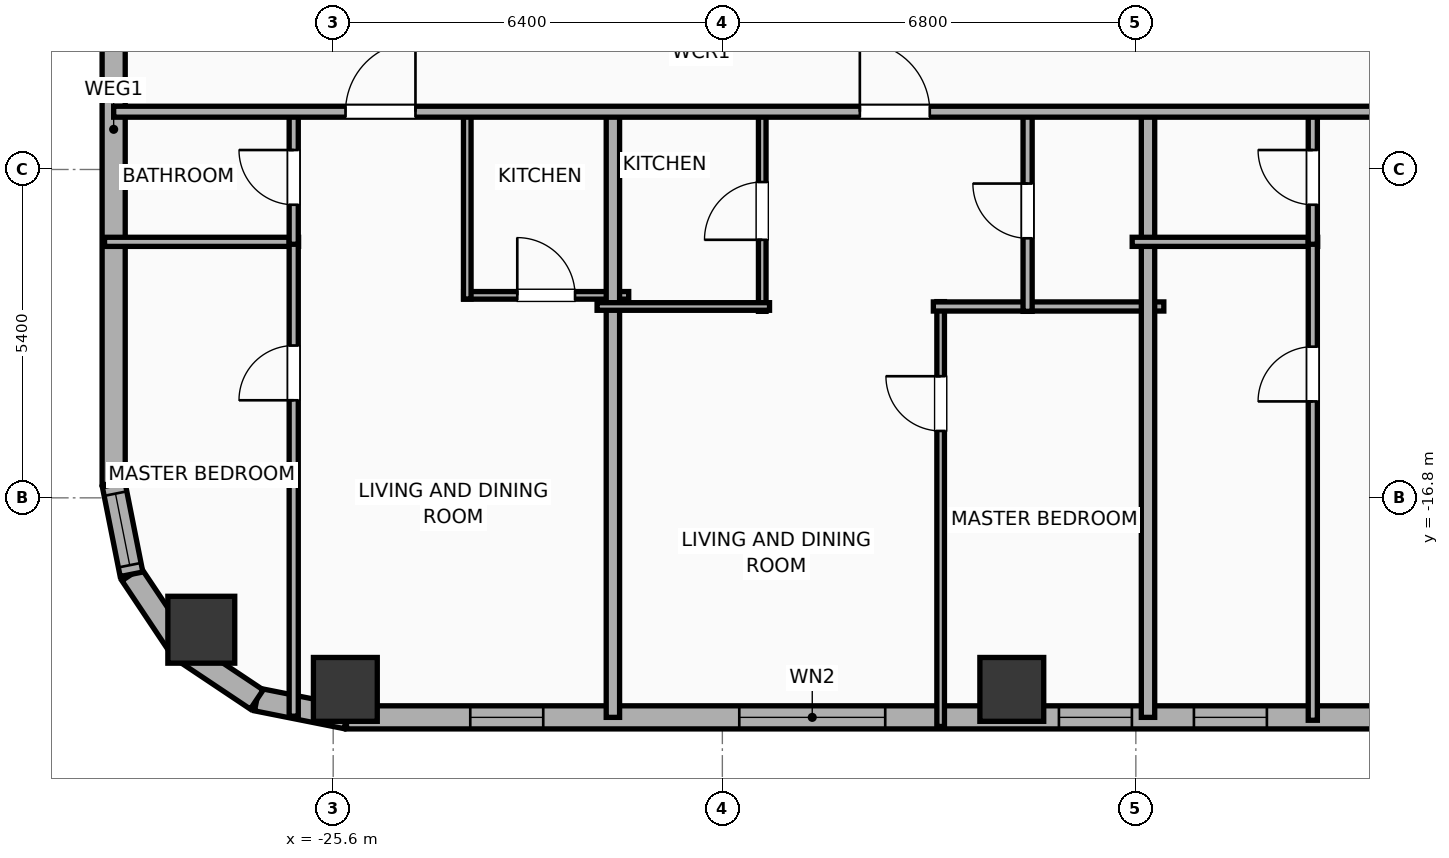
"""IFC4 building model, lengths in metres.
Left out: names, types, materials, properties, quantities, classifications, styles, units other than length and angle.
Written with IfcOpenShell. Run it as: python <this file> out.ifc"""

import sys

from ifc_helpers import new_model, si_unit, direction, frame, frame_2d, origin, origin_2d, place, context, subcontext, project, spatial, rectangle, hollow_rectangle, hollow_circle, extrude, element, fill, save


model = new_model("IFC4")
c1 = context("Model", 3, precision=1e-05, world=origin(), true_north=direction((0.0, 1.0)))
c2 = subcontext(c1, "Body", "Model", "MODEL_VIEW")
j1 = project(units=[si_unit("LENGTHUNIT", "METRE"), si_unit("PLANEANGLEUNIT", "RADIAN")], contexts=[c1])
p1 = place(None, origin())
s1 = spatial("IfcSite", under=j1, at=p1, CompositionType="ELEMENT")
p2 = place(p1, origin())
s2 = spatial("IfcBuilding", under=s1, at=p2, CompositionType="ELEMENT")
p3 = place(p2, frame((0.0, 0.0, 117.0)))
s3 = spatial("IfcBuildingStorey", under=s2, at=p3, CompositionType="ELEMENT", Elevation=117.0)
for number, where, z_axis, x_axis in (
    (1, (-25.4, -19.95, 0.0), (0.0, 0.0, 1.0), (1.0, 0.0, 0.0)),
    (2, (-14.44, -19.95, 0.0), (0.0, 0.0, 1.0), (1.0, 0.0, 0.0)),
):
    element("IfcColumn", number, at=place(p3, frame(where, z_axis=z_axis, x_axis=x_axis)), inside=s3, PredefinedType="COLUMN", context=c2, shape_type="SweptSolid", body=[
        extrude(hollow_rectangle(XDim=1.05, YDim=1.05, WallThickness=0.036, at=origin_2d()), origin(), (0.0, 0.0, 1.0), 3.9),
    ])
p4 = place(p3, frame((-27.769, -18.969, 0.0), z_axis=(0.0, 0.0, 1.0), x_axis=(1.0, 0.0, 0.0)))
e3 = element("IfcColumn", 3, at=p4, inside=s3, PredefinedType="COLUMN", context=c2, shape_type="SweptSolid", body=[
    extrude(hollow_circle(Radius=0.55, WallThickness=0.036, at=origin_2d()), origin(), (0.0, 0.0, 1.0), 3.9),
])
p5 = place(p3, frame((-6.762, -20.41, 0.0), z_axis=(0.0, 0.0, 1.0), x_axis=(-1.0, 0.0, 0.0)))
e4 = element("IfcWall", 4, at=p5, inside=s3, PredefinedType="ELEMENTEDWALL", context=c2, shape_type="SweptSolid", body=[
    extrude(rectangle(XDim=18.619, YDim=0.38, at=frame_2d((9.31, 0.0))), origin(), (0.0, 0.0, 1.0), 3.65),
])
p6 = place(p5, frame((9.76, 0.0, 0.75)))
e5 = element("IfcOpeningElement", 5, at=p6, cuts=e4, PredefinedType="OPENING", context=c2, shape_type="SweptSolid", body=[
    extrude(rectangle(XDim=2.4, YDim=2.1, at=frame_2d((1.2, 1.05))), frame((0.0, 0.2, 0.0), z_axis=(0.0, -1.0, 0.0), x_axis=(1.0, 0.0, 0.0)), (0.0, 0.0, 1.0), 0.4),
])
p7 = place(p5, frame((15.384, 0.0, 0.75)))
e6 = element("IfcOpeningElement", 6, at=p7, cuts=e4, PredefinedType="OPENING", context=c2, shape_type="SweptSolid", body=[
    extrude(rectangle(XDim=1.2, YDim=2.05, at=frame_2d((0.6, 1.025))), frame((0.0, 0.2, 0.0), z_axis=(0.0, -1.0, 0.0), x_axis=(1.0, 0.0, 0.0)), (0.0, 0.0, 1.0), 0.4),
])
p8 = place(p5, frame((5.703, 0.0, 0.75)))
e7 = element("IfcOpeningElement", 7, at=p8, cuts=e4, PredefinedType="OPENING", context=c2, shape_type="SweptSolid", body=[
    extrude(rectangle(XDim=1.2, YDim=2.05, at=frame_2d((0.6, 1.025))), frame((0.0, 0.2, 0.0), z_axis=(0.0, -1.0, 0.0), x_axis=(1.0, 0.0, 0.0)), (0.0, 0.0, 1.0), 0.4),
])
p9 = place(p5, frame((3.483, 0.0, 0.75)))
e8 = element("IfcOpeningElement", 8, at=p9, cuts=e4, PredefinedType="OPENING", context=c2, shape_type="SweptSolid", body=[
    extrude(rectangle(XDim=1.2, YDim=2.05, at=frame_2d((0.6, 1.025))), frame((0.0, 0.2, 0.0), z_axis=(0.0, -1.0, 0.0), x_axis=(1.0, 0.0, 0.0)), (0.0, 0.0, 1.0), 0.4),
])
p10 = place(p3, frame((-25.381, -20.41, 0.0), z_axis=(0.0, 0.0, 1.0), x_axis=(-0.980786132421, 0.195086038585, 0.0)))
e9 = element("IfcWall", 9, at=p10, inside=s3, PredefinedType="ELEMENTEDWALL", context=c2, shape_type="SweptSolid", body=[
    extrude(rectangle(XDim=1.504, YDim=0.38, at=frame_2d((0.752, 0.0))), origin(), (0.0, 0.0, 1.0), 3.65),
])
p11 = place(p3, frame((-26.857, -20.116, 0.0), z_axis=(0.0, 0.0, 1.0), x_axis=(-0.831468045563, 0.555572577804, 0.0)))
e10 = element("IfcWall", 10, at=p11, inside=s3, PredefinedType="ELEMENTEDWALL", context=c2, shape_type="SweptSolid", body=[
    extrude(rectangle(XDim=1.485, YDim=0.38, at=frame_2d((0.742, 0.0))), origin(), (0.0, 0.0, 1.0), 3.65),
])
p12 = place(p3, frame((-28.091, -19.292, 0.0), z_axis=(0.0, 0.0, 1.0), x_axis=(-0.555610286119, 0.831442848281, 0.0)))
e11 = element("IfcWall", 11, at=p12, inside=s3, PredefinedType="ELEMENTEDWALL", context=c2, shape_type="SweptSolid", body=[
    extrude(rectangle(XDim=1.485, YDim=0.38, at=frame_2d((0.743, 0.0))), origin(), (0.0, 0.0, 1.0), 3.65),
])
p13 = place(p3, frame((-28.917, -18.057, 0.0), z_axis=(0.0, 0.0, 1.0), x_axis=(-0.195086038585, 0.980786132421, 0.0)))
e12 = element("IfcWall", 12, at=p13, inside=s3, PredefinedType="ELEMENTEDWALL", context=c2, shape_type="SweptSolid", body=[
    extrude(rectangle(XDim=1.504, YDim=0.38, at=frame_2d((0.752, 0.0))), origin(), (0.0, 0.0, 1.0), 3.65),
])
p14 = place(p13, frame((0.152, 0.0, 0.75)))
e13 = element("IfcOpeningElement", 13, at=p14, cuts=e12, PredefinedType="OPENING", context=c2, shape_type="SweptSolid", body=[
    extrude(rectangle(XDim=1.2, YDim=2.05, at=frame_2d((0.6, 1.025))), frame((0.0, 0.2, 0.0), z_axis=(0.0, -1.0, 0.0), x_axis=(1.0, 0.0, 0.0)), (0.0, 0.0, 1.0), 0.4),
])
p15 = place(p3, frame((-29.21, -16.581, 0.0), z_axis=(0.0, 0.0, 1.0), x_axis=(0.0, 1.0, 0.0)))
e14 = element("IfcWall", 14, at=p15, inside=s3, PredefinedType="ELEMENTEDWALL", context=c2, shape_type="SweptSolid", body=[
    extrude(rectangle(XDim=11.683, YDim=0.38, at=frame_2d((5.842, 0.0))), origin(), (0.0, 0.0, 1.0), 3.65),
])
p16 = place(p3, frame((-29.36, -12.59, 0.0), z_axis=(0.0, 0.0, 1.0), x_axis=(1.0, 0.0, 0.0)))
e15 = element("IfcWall", 15, at=p16, inside=s3, PredefinedType="PLUMBINGWALL", context=c2, shape_type="SweptSolid", body=[
    extrude(rectangle(XDim=3.191, YDim=0.15, at=frame_2d((1.596, 0.0))), origin(), (0.0, 0.0, 1.0), 3.65),
])
p17 = place(p3, frame((-26.249, -20.39, 0.0), z_axis=(0.0, 0.0, 1.0), x_axis=(0.0, 1.0, 0.0)))
e16 = element("IfcWall", 16, at=p17, inside=s3, PredefinedType="PLUMBINGWALL", context=c2, shape_type="SweptSolid", body=[
    extrude(rectangle(XDim=7.84, YDim=0.15, at=frame_2d((3.92, 0.0))), origin(), (0.0, 0.0, 1.0), 3.65),
])
p18 = place(p17, frame((5.195, 0.0, 0.0)))
e17 = element("IfcOpeningElement", 17, at=p18, cuts=e16, PredefinedType="OPENING", context=c2, shape_type="SweptSolid", body=[
    extrude(rectangle(XDim=0.9, YDim=2.05, at=frame_2d((0.45, 1.025))), frame((0.0, 0.085, 0.0), z_axis=(0.0, -1.0, 0.0), x_axis=(1.0, 0.0, 0.0)), (0.0, 0.0, 1.0), 0.17),
])
p19 = place(p3, frame((-26.249, -12.63, 0.0), z_axis=(0.0, 0.0, 1.0), x_axis=(0.0, 1.0, 0.0)))
e18 = element("IfcWall", 18, at=p19, inside=s3, PredefinedType="PLUMBINGWALL", context=c2, shape_type="SweptSolid", body=[
    extrude(rectangle(XDim=2.2, YDim=0.15, at=frame_2d((1.1, 0.0))), origin(), (0.0, 0.0, 1.0), 3.65),
])
p20 = place(p19, frame((0.65, 0.0, 0.0)))
e19 = element("IfcOpeningElement", 19, at=p20, cuts=e18, PredefinedType="OPENING", context=c2, shape_type="SweptSolid", body=[
    extrude(rectangle(XDim=0.9, YDim=2.05, at=frame_2d((0.45, 1.025))), frame((0.0, 0.085, 0.0), z_axis=(0.0, -1.0, 0.0), x_axis=(1.0, 0.0, 0.0)), (0.0, 0.0, 1.0), 0.17),
])
p21 = place(p3, frame((-23.455, -13.47, 0.0), z_axis=(0.0, 0.0, 1.0), x_axis=(1.0, 0.0, 0.0)))
e20 = element("IfcWall", 20, at=p21, inside=s3, PredefinedType="PARTITIONING", context=c2, shape_type="SweptSolid", body=[
    extrude(rectangle(XDim=2.715, YDim=0.125, at=frame_2d((1.357, 0.0))), origin(), (0.0, 0.0, 1.0), 3.65),
])
p22 = place(p21, frame((0.883, 0.0, 0.0)))
e21 = element("IfcOpeningElement", 21, at=p22, cuts=e20, PredefinedType="OPENING", context=c2, shape_type="SweptSolid", body=[
    extrude(rectangle(XDim=0.95, YDim=2.05, at=frame_2d((0.475, 1.025))), frame((0.0, 0.073, 0.0), z_axis=(0.0, -1.0, 0.0), x_axis=(1.0, 0.0, 0.0)), (0.0, 0.0, 1.0), 0.145),
])
p23 = place(p3, frame((-23.395, -13.53, 0.0), z_axis=(0.0, 0.0, 1.0), x_axis=(0.0, 1.0, 0.0)))
e22 = element("IfcWall", 22, at=p23, inside=s3, PredefinedType="PARTITIONING", context=c2, shape_type="SweptSolid", body=[
    extrude(rectangle(XDim=3.1, YDim=0.125, at=frame_2d((1.55, 0.0))), origin(), (0.0, 0.0, 1.0), 3.65),
])
p24 = place(p3, frame((-21.0, -20.41, 0.0), z_axis=(0.0, 0.0, 1.0), x_axis=(0.0, 1.0, 0.0)))
e23 = element("IfcWall", 23, at=p24, inside=s3, PredefinedType="PARTITIONING", context=c2, shape_type="SweptSolid", body=[
    extrude(rectangle(XDim=10.04, YDim=0.22, at=frame_2d((5.02, 0.0))), origin(), (0.0, 0.0, 1.0), 3.65),
])
p25 = place(p3, frame((-15.61, -20.56, 0.0), z_axis=(0.0, 0.0, 1.0), x_axis=(0.0, 1.0, 0.0)))
e24 = element("IfcWall", 24, at=p25, inside=s3, PredefinedType="PARTITIONING", context=c2, shape_type="SweptSolid", body=[
    extrude(rectangle(XDim=6.987, YDim=0.125, at=frame_2d((3.494, 0.0))), origin(), (0.0, 0.0, 1.0), 3.65),
])
p26 = place(p25, frame((4.86, 0.0, 0.0)))
e25 = element("IfcOpeningElement", 25, at=p26, cuts=e24, PredefinedType="OPENING", context=c2, shape_type="SweptSolid", body=[
    extrude(rectangle(XDim=0.9, YDim=2.05, at=frame_2d((0.45, 1.025))), frame((0.0, 0.073, 0.0), z_axis=(0.0, -1.0, 0.0), x_axis=(1.0, 0.0, 0.0)), (0.0, 0.0, 1.0), 0.145),
])
p27 = place(p3, frame((-15.73, -13.653, 0.0), z_axis=(0.0, 0.0, 1.0), x_axis=(1.0, 0.0, 0.0)))
e26 = element("IfcWall", 26, at=p27, inside=s3, PredefinedType="PLUMBINGWALL", context=c2, shape_type="SweptSolid", body=[
    extrude(rectangle(XDim=3.79, YDim=0.15, at=frame_2d((1.895, 0.0))), origin(), (0.0, 0.0, 1.0), 3.65),
])
p28 = place(p3, frame((-18.544, -13.733, 0.0), z_axis=(0.0, 0.0, 1.0), x_axis=(0.0, 1.0, 0.0)))
e27 = element("IfcWall", 27, at=p28, inside=s3, PredefinedType="PARTITIONING", context=c2, shape_type="SweptSolid", body=[
    extrude(rectangle(XDim=3.303, YDim=0.125, at=frame_2d((1.651, 0.0))), origin(), (0.0, 0.0, 1.0), 3.65),
])
p29 = place(p28, frame((1.177, 0.0, 0.0)))
e28 = element("IfcOpeningElement", 28, at=p29, cuts=e27, PredefinedType="OPENING", context=c2, shape_type="SweptSolid", body=[
    extrude(rectangle(XDim=0.95, YDim=2.05, at=frame_2d((0.475, 1.025))), frame((0.0, 0.073, 0.0), z_axis=(0.0, -1.0, 0.0), x_axis=(1.0, 0.0, 0.0)), (0.0, 0.0, 1.0), 0.145),
])
p30 = place(p3, frame((-21.26, -13.653, 0.0), z_axis=(0.0, 0.0, 1.0), x_axis=(1.0, 0.0, 0.0)))
e29 = element("IfcWall", 29, at=p30, inside=s3, PredefinedType="PARTITIONING", context=c2, shape_type="SweptSolid", body=[
    extrude(rectangle(XDim=2.836, YDim=0.125, at=frame_2d((1.418, 0.0))), origin(), (0.0, 0.0, 1.0), 3.65),
])
p31 = place(p3, frame((-14.18, -13.733, 0.0), z_axis=(0.0, 0.0, 1.0), x_axis=(0.0, 1.0, 0.0)))
e30 = element("IfcWall", 30, at=p31, inside=s3, PredefinedType="PLUMBINGWALL", context=c2, shape_type="SweptSolid", body=[
    extrude(rectangle(XDim=3.303, YDim=0.15, at=frame_2d((1.651, 0.0))), origin(), (0.0, 0.0, 1.0), 3.65),
])
p32 = place(p31, frame((1.201, 0.0, 0.0)))
e31 = element("IfcOpeningElement", 31, at=p32, cuts=e30, PredefinedType="OPENING", context=c2, shape_type="SweptSolid", body=[
    extrude(rectangle(XDim=0.9, YDim=2.05, at=frame_2d((0.45, 1.025))), frame((0.0, 0.085, 0.0), z_axis=(0.0, -1.0, 0.0), x_axis=(1.0, 0.0, 0.0)), (0.0, 0.0, 1.0), 0.17),
])
p33 = place(p3, frame((-12.2, -20.41, 0.0), z_axis=(0.0, 0.0, 1.0), x_axis=(0.0, 1.0, 0.0)))
e32 = element("IfcWall", 32, at=p33, inside=s3, PredefinedType="PARTITIONING", context=c2, shape_type="SweptSolid", body=[
    extrude(rectangle(XDim=10.04, YDim=0.22, at=frame_2d((5.02, 0.0))), origin(), (0.0, 0.0, 1.0), 3.65),
])
p34 = place(p3, frame((-12.46, -12.59, 0.0), z_axis=(0.0, 0.0, 1.0), x_axis=(1.0, 0.0, 0.0)))
e33 = element("IfcWall", 33, at=p34, inside=s3, PredefinedType="PLUMBINGWALL", context=c2, shape_type="SweptSolid", body=[
    extrude(rectangle(XDim=3.05, YDim=0.15, at=frame_2d((1.525, 0.0))), origin(), (0.0, 0.0, 1.0), 3.65),
])
p35 = place(p3, frame((-9.49, -20.458, 0.0), z_axis=(0.0, 0.0, 1.0), x_axis=(0.0, 1.0, 0.0)))
e34 = element("IfcWall", 34, at=p35, inside=s3, PredefinedType="PLUMBINGWALL", context=c2, shape_type="SweptSolid", body=[
    extrude(rectangle(XDim=7.907, YDim=0.15, at=frame_2d((3.954, 0.0))), origin(), (0.0, 0.0, 1.0), 3.65),
])
p36 = place(p35, frame((5.243, 0.0, 0.0)))
e35 = element("IfcOpeningElement", 35, at=p36, cuts=e34, PredefinedType="OPENING", context=c2, shape_type="SweptSolid", body=[
    extrude(rectangle(XDim=0.9, YDim=2.05, at=frame_2d((0.45, 1.025))), frame((0.0, 0.085, 0.0), z_axis=(0.0, -1.0, 0.0), x_axis=(1.0, 0.0, 0.0)), (0.0, 0.0, 1.0), 0.17),
])
p37 = place(p3, frame((-9.49, -12.63, 0.0), z_axis=(0.0, 0.0, 1.0), x_axis=(0.0, 1.0, 0.0)))
e36 = element("IfcWall", 36, at=p37, inside=s3, PredefinedType="PLUMBINGWALL", context=c2, shape_type="SweptSolid", body=[
    extrude(rectangle(XDim=2.2, YDim=0.15, at=frame_2d((1.1, 0.0))), origin(), (0.0, 0.0, 1.0), 3.65),
])
p38 = place(p37, frame((0.65, 0.0, 0.0)))
e37 = element("IfcOpeningElement", 37, at=p38, cuts=e36, PredefinedType="OPENING", context=c2, shape_type="SweptSolid", body=[
    extrude(rectangle(XDim=0.9, YDim=2.05, at=frame_2d((0.45, 1.025))), frame((0.0, 0.085, 0.0), z_axis=(0.0, -1.0, 0.0), x_axis=(1.0, 0.0, 0.0)), (0.0, 0.0, 1.0), 0.17),
])
p39 = place(p3, frame((-29.21, -10.45, 0.0), z_axis=(0.0, 0.0, 1.0), x_axis=(1.0, 0.0, 0.0)))
e38 = element("IfcWall", 38, at=p39, inside=s3, PredefinedType="PARTITIONING", context=c2, shape_type="SweptSolid", body=[
    extrude(rectangle(XDim=62.42, YDim=0.18, at=frame_2d((31.21, 0.0))), origin(), (0.0, 0.0, 1.0), 3.65),
])
p40 = place(p39, frame((3.813, 0.0, 0.0)))
e39 = element("IfcOpeningElement", 39, at=p40, cuts=e38, PredefinedType="OPENING", context=c2, shape_type="SweptSolid", body=[
    extrude(rectangle(XDim=1.15, YDim=2.05, at=frame_2d((0.575, 1.025))), frame((0.0, 0.1, 0.0), z_axis=(0.0, -1.0, 0.0), x_axis=(1.0, 0.0, 0.0)), (0.0, 0.0, 1.0), 0.2),
])
p41 = place(p39, frame((12.271, 0.0, 0.0)))
e40 = element("IfcOpeningElement", 40, at=p41, cuts=e38, PredefinedType="OPENING", context=c2, shape_type="SweptSolid", body=[
    extrude(rectangle(XDim=1.15, YDim=2.05, at=frame_2d((0.575, 1.025))), frame((0.0, 0.1, 0.0), z_axis=(0.0, -1.0, 0.0), x_axis=(1.0, 0.0, 0.0)), (0.0, 0.0, 1.0), 0.2),
])
p42 = place(p39, frame((20.804, 0.0, 0.0)))
e41 = element("IfcOpeningElement", 41, at=p42, cuts=e38, PredefinedType="OPENING", context=c2, shape_type="SweptSolid", body=[
    extrude(rectangle(XDim=1.15, YDim=2.05, at=frame_2d((0.575, 1.025))), frame((0.0, 0.1, 0.0), z_axis=(0.0, -1.0, 0.0), x_axis=(1.0, 0.0, 0.0)), (0.0, 0.0, 1.0), 0.2),
])
p43 = place(p39, frame((29.848, 0.0, 0.0)))
e42 = element("IfcOpeningElement", 42, at=p43, cuts=e38, PredefinedType="OPENING", context=c2, shape_type="SweptSolid", body=[
    extrude(rectangle(XDim=1.15, YDim=2.05, at=frame_2d((0.575, 1.025))), frame((0.0, 0.1, 0.0), z_axis=(0.0, -1.0, 0.0), x_axis=(1.0, 0.0, 0.0)), (0.0, 0.0, 1.0), 0.2),
])
p44 = place(p39, frame((38.45, 0.0, 0.0)))
e43 = element("IfcOpeningElement", 43, at=p44, cuts=e38, PredefinedType="OPENING", context=c2, shape_type="SweptSolid", body=[
    extrude(rectangle(XDim=1.15, YDim=2.05, at=frame_2d((0.575, 1.025))), frame((0.0, 0.1, 0.0), z_axis=(0.0, -1.0, 0.0), x_axis=(1.0, 0.0, 0.0)), (0.0, 0.0, 1.0), 0.2),
])
p45 = place(p39, frame((47.42, 0.0, 0.0)))
e44 = element("IfcOpeningElement", 44, at=p45, cuts=e38, PredefinedType="OPENING", context=c2, shape_type="SweptSolid", body=[
    extrude(rectangle(XDim=1.15, YDim=2.05, at=frame_2d((0.575, 1.025))), frame((0.0, 0.1, 0.0), z_axis=(0.0, -1.0, 0.0), x_axis=(1.0, 0.0, 0.0)), (0.0, 0.0, 1.0), 0.2),
])
p46 = place(p39, frame((56.92, 0.0, 0.0)))
e45 = element("IfcOpeningElement", 45, at=p46, cuts=e38, PredefinedType="OPENING", context=c2, shape_type="SweptSolid", body=[
    extrude(rectangle(XDim=1.15, YDim=2.05, at=frame_2d((0.575, 1.025))), frame((0.0, 0.1, 0.0), z_axis=(0.0, -1.0, 0.0), x_axis=(1.0, 0.0, 0.0)), (0.0, 0.0, 1.0), 0.2),
])
p47 = place(p6, origin())
e46 = element("IfcWindow", 46, at=p47, inside=s3, PartitioningType="SINGLE_PANEL", PredefinedType="WINDOW", context=c2, shape_type="SweptSolid", body=[
    extrude(rectangle(XDim=2.4, YDim=2.1, at=frame_2d((1.2, 1.05))), frame((0.0, 0.03, 0.0), z_axis=(0.0, -1.0, 0.0), x_axis=(1.0, 0.0, 0.0)), (0.0, 0.0, 1.0), 0.06),
])
fill(e5, e46)
p48 = place(p14, origin())
e47 = element("IfcWindow", 47, at=p48, inside=s3, PartitioningType="SINGLE_PANEL", PredefinedType="WINDOW", context=c2, shape_type="SweptSolid", body=[
    extrude(rectangle(XDim=1.2, YDim=2.05, at=frame_2d((0.6, 1.025))), frame((0.0, 0.03, 0.0), z_axis=(0.0, -1.0, 0.0), x_axis=(1.0, 0.0, 0.0)), (0.0, 0.0, 1.0), 0.06),
])
fill(e13, e47)
p49 = place(p7, origin())
e48 = element("IfcWindow", 48, at=p49, inside=s3, PartitioningType="SINGLE_PANEL", PredefinedType="WINDOW", context=c2, shape_type="SweptSolid", body=[
    extrude(rectangle(XDim=1.2, YDim=2.05, at=frame_2d((0.6, 1.025))), frame((0.0, 0.03, 0.0), z_axis=(0.0, -1.0, 0.0), x_axis=(1.0, 0.0, 0.0)), (0.0, 0.0, 1.0), 0.06),
])
fill(e6, e48)
p50 = place(p8, origin())
e49 = element("IfcWindow", 49, at=p50, inside=s3, PartitioningType="SINGLE_PANEL", PredefinedType="WINDOW", context=c2, shape_type="SweptSolid", body=[
    extrude(rectangle(XDim=1.2, YDim=2.05, at=frame_2d((0.6, 1.025))), frame((0.0, 0.03, 0.0), z_axis=(0.0, -1.0, 0.0), x_axis=(1.0, 0.0, 0.0)), (0.0, 0.0, 1.0), 0.06),
])
fill(e7, e49)
p51 = place(p9, origin())
e50 = element("IfcWindow", 50, at=p51, inside=s3, PartitioningType="SINGLE_PANEL", PredefinedType="WINDOW", context=c2, shape_type="SweptSolid", body=[
    extrude(rectangle(XDim=1.2, YDim=2.05, at=frame_2d((0.6, 1.025))), frame((0.0, 0.03, 0.0), z_axis=(0.0, -1.0, 0.0), x_axis=(1.0, 0.0, 0.0)), (0.0, 0.0, 1.0), 0.06),
])
fill(e8, e50)
p52 = place(p18, origin())
e51 = element("IfcDoor", 51, at=p52, inside=s3, OperationType="SINGLE_SWING_LEFT", PredefinedType="DOOR", context=c2, shape_type="SweptSolid", body=[
    extrude(rectangle(XDim=0.9, YDim=2.05, at=frame_2d((0.45, 1.025))), frame((0.0, 0.025, 0.0), z_axis=(0.0, -1.0, 0.0), x_axis=(1.0, 0.0, 0.0)), (0.0, 0.0, 1.0), 0.05),
])
fill(e17, e51)
p53 = place(p20, origin())
e52 = element("IfcDoor", 52, at=p53, inside=s3, OperationType="SINGLE_SWING_RIGHT", PredefinedType="DOOR", context=c2, shape_type="SweptSolid", body=[
    extrude(rectangle(XDim=0.9, YDim=2.05, at=frame_2d((0.45, 1.025))), frame((0.0, 0.025, 0.0), z_axis=(0.0, -1.0, 0.0), x_axis=(1.0, 0.0, 0.0)), (0.0, 0.0, 1.0), 0.05),
])
fill(e19, e52)
p54 = place(p22, origin())
e53 = element("IfcDoor", 53, at=p54, inside=s3, OperationType="SINGLE_SWING_LEFT", PredefinedType="DOOR", context=c2, shape_type="SweptSolid", body=[
    extrude(rectangle(XDim=0.95, YDim=2.05, at=frame_2d((0.475, 1.025))), frame((0.0, 0.025, 0.0), z_axis=(0.0, -1.0, 0.0), x_axis=(1.0, 0.0, 0.0)), (0.0, 0.0, 1.0), 0.05),
])
fill(e21, e53)
p55 = place(p26, origin())
e54 = element("IfcDoor", 54, at=p55, inside=s3, OperationType="SINGLE_SWING_RIGHT", PredefinedType="DOOR", context=c2, shape_type="SweptSolid", body=[
    extrude(rectangle(XDim=0.9, YDim=2.05, at=frame_2d((0.45, 1.025))), frame((0.0, 0.025, 0.0), z_axis=(0.0, -1.0, 0.0), x_axis=(1.0, 0.0, 0.0)), (0.0, 0.0, 1.0), 0.05),
])
fill(e25, e54)
p56 = place(p29, origin())
e55 = element("IfcDoor", 55, at=p56, inside=s3, OperationType="SINGLE_SWING_LEFT", PredefinedType="DOOR", context=c2, shape_type="SweptSolid", body=[
    extrude(rectangle(XDim=0.95, YDim=2.05, at=frame_2d((0.475, 1.025))), frame((0.0, 0.025, 0.0), z_axis=(0.0, -1.0, 0.0), x_axis=(1.0, 0.0, 0.0)), (0.0, 0.0, 1.0), 0.05),
])
fill(e28, e55)
p57 = place(p32, origin())
e56 = element("IfcDoor", 56, at=p57, inside=s3, OperationType="SINGLE_SWING_RIGHT", PredefinedType="DOOR", context=c2, shape_type="SweptSolid", body=[
    extrude(rectangle(XDim=0.9, YDim=2.05, at=frame_2d((0.45, 1.025))), frame((0.0, 0.025, 0.0), z_axis=(0.0, -1.0, 0.0), x_axis=(1.0, 0.0, 0.0)), (0.0, 0.0, 1.0), 0.05),
])
fill(e31, e56)
p58 = place(p36, origin())
e57 = element("IfcDoor", 57, at=p58, inside=s3, OperationType="SINGLE_SWING_LEFT", PredefinedType="DOOR", context=c2, shape_type="SweptSolid", body=[
    extrude(rectangle(XDim=0.9, YDim=2.05, at=frame_2d((0.45, 1.025))), frame((0.0, 0.025, 0.0), z_axis=(0.0, -1.0, 0.0), x_axis=(1.0, 0.0, 0.0)), (0.0, 0.0, 1.0), 0.05),
])
fill(e35, e57)
p59 = place(p38, origin())
e58 = element("IfcDoor", 58, at=p59, inside=s3, OperationType="SINGLE_SWING_RIGHT", PredefinedType="DOOR", context=c2, shape_type="SweptSolid", body=[
    extrude(rectangle(XDim=0.9, YDim=2.05, at=frame_2d((0.45, 1.025))), frame((0.0, 0.025, 0.0), z_axis=(0.0, -1.0, 0.0), x_axis=(1.0, 0.0, 0.0)), (0.0, 0.0, 1.0), 0.05),
])
fill(e37, e58)
p60 = place(p40, origin())
e59 = element("IfcDoor", 59, at=p60, inside=s3, OperationType="SINGLE_SWING_RIGHT", PredefinedType="DOOR", context=c2, shape_type="SweptSolid", body=[
    extrude(rectangle(XDim=1.15, YDim=2.05, at=frame_2d((0.575, 1.025))), frame((0.0, 0.025, 0.0), z_axis=(0.0, -1.0, 0.0), x_axis=(1.0, 0.0, 0.0)), (0.0, 0.0, 1.0), 0.05),
])
fill(e39, e59)
p61 = place(p41, origin())
e60 = element("IfcDoor", 60, at=p61, inside=s3, OperationType="SINGLE_SWING_LEFT", PredefinedType="DOOR", context=c2, shape_type="SweptSolid", body=[
    extrude(rectangle(XDim=1.15, YDim=2.05, at=frame_2d((0.575, 1.025))), frame((0.0, 0.025, 0.0), z_axis=(0.0, -1.0, 0.0), x_axis=(1.0, 0.0, 0.0)), (0.0, 0.0, 1.0), 0.05),
])
fill(e40, e60)
save(model, sys.argv[1])
